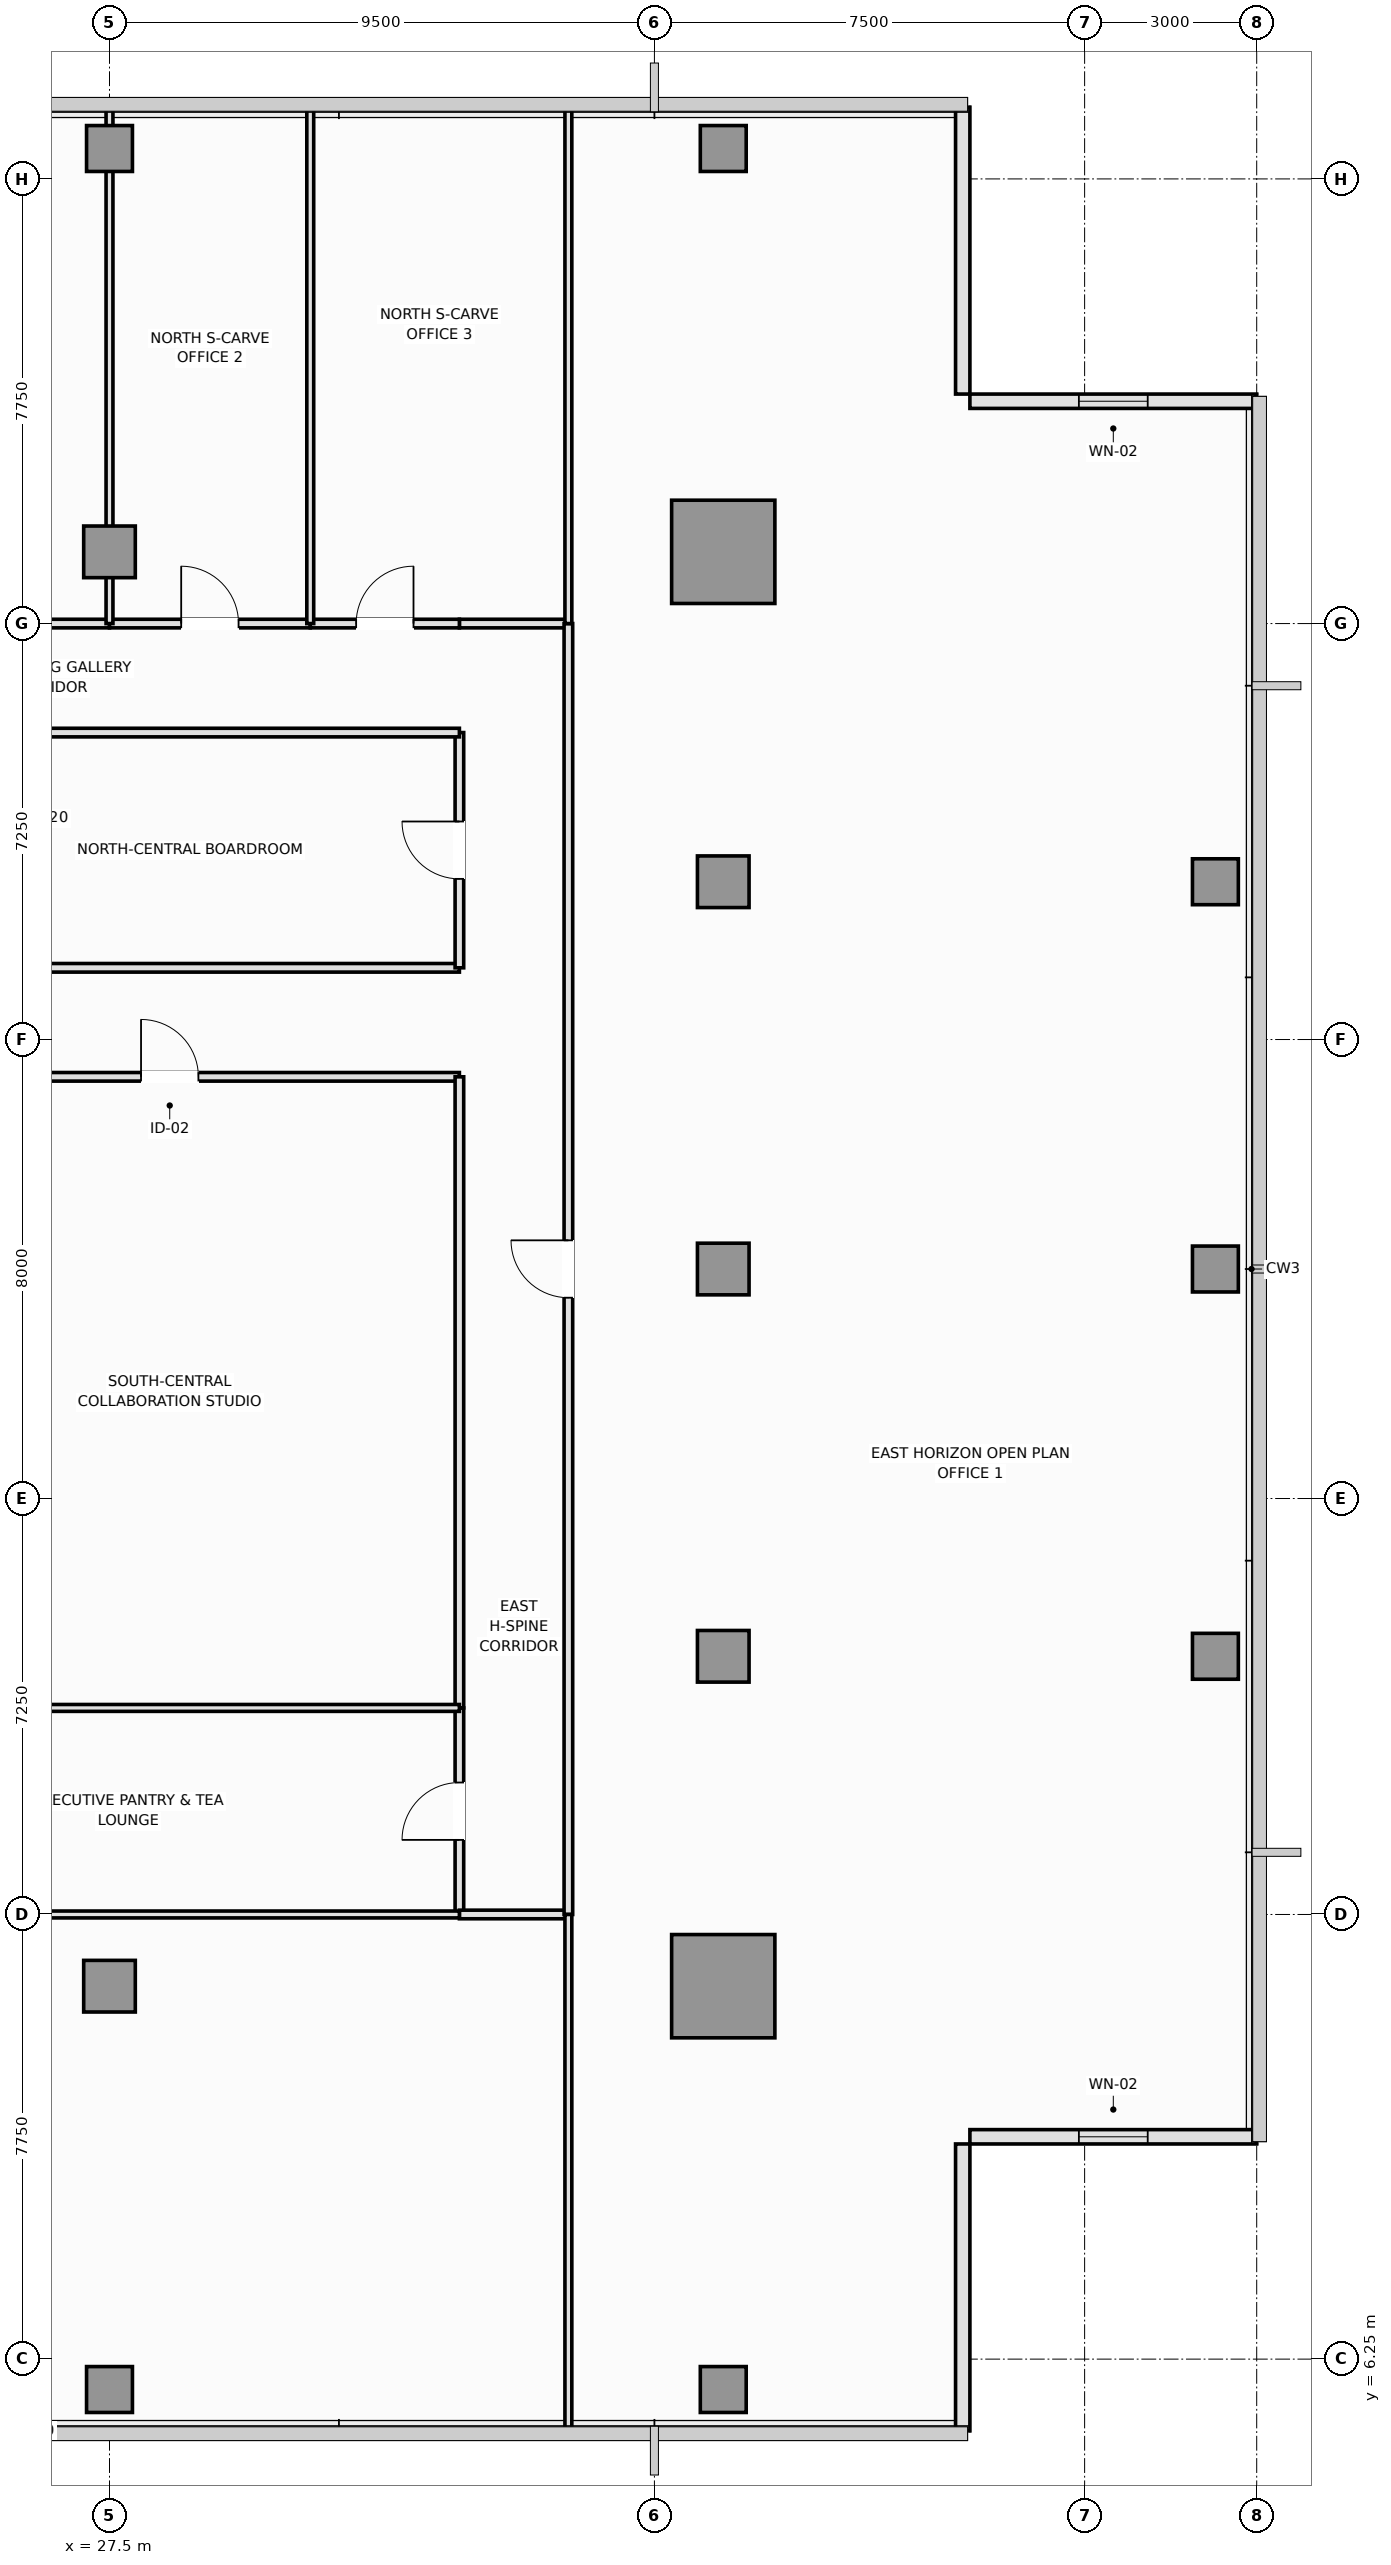
"""IFC4 building model, lengths in metres.
Left out: names, types, materials, properties, quantities, classifications, styles, units other than length and angle.
Written with IfcOpenShell. Run it as: python <this file> out.ifc"""

import sys

from ifc_helpers import new_model, si_unit, direction, frame, frame_2d, origin, origin_2d, place, context, subcontext, project, spatial, rectangle, extrude, element, fill, save


model = new_model("IFC4")
c1 = context("Model", 3, precision=1e-05, world=origin(), true_north=direction((0.0, 1.0)))
c2 = subcontext(c1, "Body", "Model", "MODEL_VIEW")
j1 = project(units=[si_unit("LENGTHUNIT", "METRE"), si_unit("PLANEANGLEUNIT", "RADIAN")], contexts=[c1])
p1 = place(None, origin())
s1 = spatial("IfcSite", under=j1, at=p1, CompositionType="ELEMENT")
p2 = place(p1, origin())
s2 = spatial("IfcBuilding", under=s1, at=p2, CompositionType="ELEMENT")
p3 = place(p2, frame((0.0, 0.0, 234.2)))
s3 = spatial("IfcBuildingStorey", under=s2, at=p3, CompositionType="ELEMENT", Elevation=234.2)
for number, where, z_axis, x_axis in (
    (1, (38.2, 12.75, 0.0), (0.0, 0.0, 1.0), (1.0, 0.0, 0.0)),
    (2, (38.2, 37.75, 0.0), (0.0, 0.0, 1.0), (1.0, 0.0, 0.0)),
):
    element("IfcColumn", number, at=place(p3, frame(where, z_axis=z_axis, x_axis=x_axis)), inside=s3, PredefinedType="COLUMN", context=c2, shape_type="SweptSolid", body=[
        extrude(rectangle(XDim=1.8, YDim=1.8, at=origin_2d()), origin(), (0.0, 0.0, 1.0), 3.55),
    ])
for number, where, z_axis, x_axis in (
    (3, (27.5, 12.75, 0.0), (0.0, 0.0, 1.0), (1.0, 0.0, 0.0)),
    (4, (27.5, 37.75, 0.0), (0.0, 0.0, 1.0), (1.0, 0.0, 0.0)),
    (5, (38.2, 18.5, 0.0), (0.0, 0.0, 1.0), (1.0, 0.0, 0.0)),
    (6, (38.2, 25.25, 0.0), (0.0, 0.0, 1.0), (1.0, 0.0, 0.0)),
    (7, (38.2, 32.0, 0.0), (0.0, 0.0, 1.0), (1.0, 0.0, 0.0)),
):
    element("IfcColumn", number, at=place(p3, frame(where, z_axis=z_axis, x_axis=x_axis)), inside=s3, PredefinedType="COLUMN", context=c2, shape_type="SweptSolid", body=[
        extrude(rectangle(XDim=0.9, YDim=0.9, at=origin_2d()), origin(), (0.0, 0.0, 1.0), 3.55),
    ])
for number, where, z_axis, x_axis in (
    (8, (46.78, 18.5, 0.0), (0.0, 0.0, 1.0), (1.0, 0.0, 0.0)),
    (9, (46.78, 25.25, 0.0), (0.0, 0.0, 1.0), (1.0, 0.0, 0.0)),
    (10, (46.78, 32.0, 0.0), (0.0, 0.0, 1.0), (1.0, 0.0, 0.0)),
    (11, (27.5, 5.72, 0.0), (0.0, 0.0, 1.0), (1.0, 0.0, 0.0)),
    (12, (38.2, 5.72, 0.0), (0.0, 0.0, 1.0), (1.0, 0.0, 0.0)),
    (13, (27.5, 44.78, 0.0), (0.0, 0.0, 1.0), (1.0, 0.0, 0.0)),
    (14, (38.2, 44.78, 0.0), (0.0, 0.0, 1.0), (1.0, 0.0, 0.0)),
):
    element("IfcColumn", number, at=place(p3, frame(where, z_axis=z_axis, x_axis=x_axis)), inside=s3, PredefinedType="COLUMN", context=c2, shape_type="SweptSolid", body=[
        extrude(rectangle(XDim=0.8, YDim=0.8, at=origin_2d()), origin(), (0.0, 0.0, 1.0), 3.55),
    ])
p4 = place(p3, frame((42.375, 5.0, 0.0), z_axis=(0.0, 0.0, 1.0), x_axis=(0.0, 1.0, 0.0)))
e15 = element("IfcWall", 15, at=p4, inside=s3, PredefinedType="SOLIDWALL", context=c2, shape_type="SweptSolid", body=[
    extrude(rectangle(XDim=5.0, YDim=0.25, at=frame_2d((2.5, 0.0))), origin(), (0.0, 0.0, 1.0), 3.37),
])
p5 = place(p3, frame((42.5, 10.125, 0.0), z_axis=(0.0, 0.0, 1.0), x_axis=(1.0, 0.0, 0.0)))
e16 = element("IfcWall", 16, at=p5, inside=s3, PredefinedType="SOLIDWALL", context=c2, shape_type="SweptSolid", body=[
    extrude(rectangle(XDim=5.0, YDim=0.25, at=frame_2d((2.5, 0.0))), origin(), (0.0, 0.0, 1.0), 3.37),
])
p6 = place(p5, frame((1.9, 0.0, 0.9)))
e17 = element("IfcOpeningElement", 17, at=p6, cuts=e16, PredefinedType="OPENING", context=c2, shape_type="SweptSolid", body=[
    extrude(rectangle(XDim=1.2, YDim=1.8, at=frame_2d((0.6, 0.9))), frame((0.0, 0.135, 0.0), z_axis=(0.0, -1.0, 0.0), x_axis=(1.0, 0.0, 0.0)), (0.0, 0.0, 1.0), 0.27),
])
p7 = place(p3, frame((47.5, 40.375, 0.0), z_axis=(0.0, 0.0, 1.0), x_axis=(-1.0, 0.0, 0.0)))
e18 = element("IfcWall", 18, at=p7, inside=s3, PredefinedType="SOLIDWALL", context=c2, shape_type="SweptSolid", body=[
    extrude(rectangle(XDim=5.0, YDim=0.25, at=frame_2d((2.5, 0.0))), origin(), (0.0, 0.0, 1.0), 3.37),
])
p8 = place(p7, frame((1.9, 0.0, 0.9)))
e19 = element("IfcOpeningElement", 19, at=p8, cuts=e18, PredefinedType="OPENING", context=c2, shape_type="SweptSolid", body=[
    extrude(rectangle(XDim=1.2, YDim=1.8, at=frame_2d((0.6, 0.9))), frame((0.0, 0.135, 0.0), z_axis=(0.0, -1.0, 0.0), x_axis=(1.0, 0.0, 0.0)), (0.0, 0.0, 1.0), 0.27),
])
p9 = place(p3, frame((42.375, 40.5, 0.0), z_axis=(0.0, 0.0, 1.0), x_axis=(0.0, 1.0, 0.0)))
e20 = element("IfcWall", 20, at=p9, inside=s3, PredefinedType="SOLIDWALL", context=c2, shape_type="SweptSolid", body=[
    extrude(rectangle(XDim=5.0, YDim=0.25, at=frame_2d((2.5, 0.0))), origin(), (0.0, 0.0, 1.0), 3.37),
])
p10 = place(p3, frame((25.65, 30.5, 0.0), z_axis=(0.0, 0.0, 1.0), x_axis=(1.0, 0.0, 0.0)))
e21 = element("IfcWall", 21, at=p10, inside=s3, PredefinedType="PARTITIONING", context=c2, shape_type="SweptSolid", body=[
    extrude(rectangle(XDim=7.95, YDim=0.15, at=frame_2d((3.975, 0.0))), origin(), (0.0, 0.0, 1.0), 3.37),
])
p11 = place(p3, frame((23.5, 28.6, 0.0), z_axis=(0.0, 0.0, 1.0), x_axis=(1.0, 0.0, 0.0)))
e22 = element("IfcWall", 22, at=p11, inside=s3, PredefinedType="PARTITIONING", context=c2, shape_type="SweptSolid", body=[
    extrude(rectangle(XDim=10.1, YDim=0.15, at=frame_2d((5.05, 0.0))), origin(), (0.0, 0.0, 1.0), 3.37),
])
p12 = place(p11, frame((4.55, 0.0, 0.0)))
e23 = element("IfcOpeningElement", 23, at=p12, cuts=e22, PredefinedType="OPENING", context=c2, shape_type="SweptSolid", body=[
    extrude(rectangle(XDim=1.0, YDim=2.15, at=frame_2d((0.5, 1.075))), frame((0.0, 0.085, 0.0), z_axis=(0.0, -1.0, 0.0), x_axis=(1.0, 0.0, 0.0)), (0.0, 0.0, 1.0), 0.17),
])
p13 = place(p3, frame((33.6, 30.5, 0.0), z_axis=(0.0, 0.0, 1.0), x_axis=(0.0, 1.0, 0.0)))
e24 = element("IfcWall", 24, at=p13, inside=s3, PredefinedType="PARTITIONING", context=c2, shape_type="SweptSolid", body=[
    extrude(rectangle(XDim=4.1, YDim=0.15, at=frame_2d((2.05, 0.0))), origin(), (0.0, 0.0, 1.0), 3.37),
])
p14 = place(p13, frame((1.55, 0.0, 0.0)))
e25 = element("IfcOpeningElement", 25, at=p14, cuts=e24, PredefinedType="OPENING", context=c2, shape_type="SweptSolid", body=[
    extrude(rectangle(XDim=1.0, YDim=2.15, at=frame_2d((0.5, 1.075))), frame((0.0, 0.085, 0.0), z_axis=(0.0, -1.0, 0.0), x_axis=(1.0, 0.0, 0.0)), (0.0, 0.0, 1.0), 0.17),
])
p15 = place(p3, frame((33.6, 14.0, 0.0), z_axis=(0.0, 0.0, 1.0), x_axis=(0.0, 1.0, 0.0)))
e26 = element("IfcWall", 26, at=p15, inside=s3, PredefinedType="PARTITIONING", context=c2, shape_type="SweptSolid", body=[
    extrude(rectangle(XDim=3.6, YDim=0.15, at=frame_2d((1.8, 0.0))), origin(), (0.0, 0.0, 1.0), 3.37),
])
p16 = place(p15, frame((1.3, 0.0, 0.0)))
e27 = element("IfcOpeningElement", 27, at=p16, cuts=e26, PredefinedType="OPENING", context=c2, shape_type="SweptSolid", body=[
    extrude(rectangle(XDim=1.0, YDim=2.15, at=frame_2d((0.5, 1.075))), frame((0.0, 0.085, 0.0), z_axis=(0.0, -1.0, 0.0), x_axis=(1.0, 0.0, 0.0)), (0.0, 0.0, 1.0), 0.17),
])
p17 = place(p3, frame((33.6, 17.6, 0.0), z_axis=(0.0, 0.0, 1.0), x_axis=(0.0, 1.0, 0.0)))
e28 = element("IfcWall", 28, at=p17, inside=s3, PredefinedType="PARTITIONING", context=c2, shape_type="SweptSolid", body=[
    extrude(rectangle(XDim=11.0, YDim=0.15, at=frame_2d((5.5, 0.0))), origin(), (0.0, 0.0, 1.0), 3.37),
])
for number, where, z_axis, x_axis in (
    (29, (33.6, 14.0, 0.0), (0.0, 0.0, 1.0), (1.0, 0.0, 0.0)),
    (30, (33.6, 36.5, 0.0), (0.0, 0.0, 1.0), (1.0, 0.0, 0.0)),
):
    element("IfcWall", number, at=place(p3, frame(where, z_axis=z_axis, x_axis=x_axis)), inside=s3, PredefinedType="PARTITIONING", context=c2, shape_type="SweptSolid", body=[
        extrude(rectangle(XDim=1.9, YDim=0.15, at=frame_2d((0.95, 0.0))), origin(), (0.0, 0.0, 1.0), 3.37),
    ])
p18 = place(p3, frame((35.5, 14.0, 0.0), z_axis=(0.0, 0.0, 1.0), x_axis=(0.0, 1.0, 0.0)))
e31 = element("IfcWall", 31, at=p18, inside=s3, PredefinedType="PARTITIONING", context=c2, shape_type="SweptSolid", body=[
    extrude(rectangle(XDim=22.5, YDim=0.15, at=frame_2d((11.25, 0.0))), origin(), (0.0, 0.0, 1.0), 3.37),
])
p19 = place(p18, frame((10.75, 0.0, 0.0)))
e32 = element("IfcOpeningElement", 32, at=p19, cuts=e31, PredefinedType="OPENING", context=c2, shape_type="SweptSolid", body=[
    extrude(rectangle(XDim=1.0, YDim=2.15, at=frame_2d((0.5, 1.075))), frame((0.0, 0.085, 0.0), z_axis=(0.0, -1.0, 0.0), x_axis=(1.0, 0.0, 0.0)), (0.0, 0.0, 1.0), 0.17),
])
p20 = place(p3, frame((25.65, 34.6, 0.0), z_axis=(0.0, 0.0, 1.0), x_axis=(1.0, 0.0, 0.0)))
e33 = element("IfcWall", 33, at=p20, inside=s3, PredefinedType="PARTITIONING", context=c2, shape_type="SweptSolid", body=[
    extrude(rectangle(XDim=7.95, YDim=0.15, at=frame_2d((3.975, 0.0))), origin(), (0.0, 0.0, 1.0), 3.37),
])
p21 = place(p3, frame((19.9, 36.5, 0.0), z_axis=(0.0, 0.0, 1.0), x_axis=(1.0, 0.0, 0.0)))
e34 = element("IfcWall", 34, at=p21, inside=s3, PredefinedType="PARTITIONING", context=c2, shape_type="SweptSolid", body=[
    extrude(rectangle(XDim=7.6, YDim=0.15, at=frame_2d((3.8, 0.0))), origin(), (0.0, 0.0, 1.0), 3.37),
])
p22 = place(p3, frame((27.5, 36.5, 0.0), z_axis=(0.0, 0.0, 1.0), x_axis=(1.0, 0.0, 0.0)))
e35 = element("IfcWall", 35, at=p22, inside=s3, PredefinedType="PARTITIONING", context=c2, shape_type="SweptSolid", body=[
    extrude(rectangle(XDim=3.5, YDim=0.15, at=frame_2d((1.75, 0.0))), origin(), (0.0, 0.0, 1.0), 3.37),
])
p23 = place(p22, frame((1.25, 0.0, 0.0)))
e36 = element("IfcOpeningElement", 36, at=p23, cuts=e35, PredefinedType="OPENING", context=c2, shape_type="SweptSolid", body=[
    extrude(rectangle(XDim=1.0, YDim=2.15, at=frame_2d((0.5, 1.075))), frame((0.0, 0.085, 0.0), z_axis=(0.0, -1.0, 0.0), x_axis=(1.0, 0.0, 0.0)), (0.0, 0.0, 1.0), 0.17),
])
p24 = place(p3, frame((31.0, 36.5, 0.0), z_axis=(0.0, 0.0, 1.0), x_axis=(1.0, 0.0, 0.0)))
e37 = element("IfcWall", 37, at=p24, inside=s3, PredefinedType="PARTITIONING", context=c2, shape_type="SweptSolid", body=[
    extrude(rectangle(XDim=2.6, YDim=0.15, at=frame_2d((1.3, 0.0))), origin(), (0.0, 0.0, 1.0), 3.37),
])
p25 = place(p24, frame((0.8, 0.0, 0.0)))
e38 = element("IfcOpeningElement", 38, at=p25, cuts=e37, PredefinedType="OPENING", context=c2, shape_type="SweptSolid", body=[
    extrude(rectangle(XDim=1.0, YDim=2.15, at=frame_2d((0.5, 1.075))), frame((0.0, 0.085, 0.0), z_axis=(0.0, -1.0, 0.0), x_axis=(1.0, 0.0, 0.0)), (0.0, 0.0, 1.0), 0.17),
])
for number, where, z_axis, x_axis in (
    (39, (23.5, 17.6, 0.0), (0.0, 0.0, 1.0), (1.0, 0.0, 0.0)),
    (40, (23.5, 14.0, 0.0), (0.0, 0.0, 1.0), (1.0, 0.0, 0.0)),
):
    element("IfcWall", number, at=place(p3, frame(where, z_axis=z_axis, x_axis=x_axis)), inside=s3, PredefinedType="PARTITIONING", context=c2, shape_type="SweptSolid", body=[
        extrude(rectangle(XDim=10.1, YDim=0.12, at=frame_2d((5.05, 0.0))), origin(), (0.0, 0.0, 1.0), 3.37),
    ])
p26 = place(p3, frame((35.5, 5.01, 0.0), z_axis=(0.0, 0.0, 1.0), x_axis=(0.0, 1.0, 0.0)))
e41 = element("IfcWall", 41, at=p26, inside=s3, PredefinedType="PARTITIONING", context=c2, shape_type="SweptSolid", body=[
    extrude(rectangle(XDim=8.99, YDim=0.12, at=frame_2d((4.495, 0.0))), origin(), (0.0, 0.0, 1.0), 3.37),
])
p27 = place(p3, frame((27.5, 36.5, 0.0), z_axis=(0.0, 0.0, 1.0), x_axis=(0.0, 1.0, 0.0)))
e42 = element("IfcWall", 42, at=p27, inside=s3, PredefinedType="PARTITIONING", context=c2, shape_type="SweptSolid", body=[
    extrude(rectangle(XDim=8.99, YDim=0.12, at=frame_2d((4.495, 0.0))), origin(), (0.0, 0.0, 1.0), 2.92),
])
for number, where, z_axis, x_axis in (
    (43, (31.0, 36.5, 0.0), (0.0, 0.0, 1.0), (0.0, 1.0, 0.0)),
    (44, (35.5, 36.5, 0.0), (0.0, 0.0, 1.0), (0.0, 1.0, 0.0)),
):
    element("IfcWall", number, at=place(p3, frame(where, z_axis=z_axis, x_axis=x_axis)), inside=s3, PredefinedType="PARTITIONING", context=c2, shape_type="SweptSolid", body=[
        extrude(rectangle(XDim=8.99, YDim=0.12, at=frame_2d((4.495, 0.0))), origin(), (0.0, 0.0, 1.0), 3.37),
    ])
p28 = place(p6, origin())
e45 = element("IfcWindow", 45, at=p28, inside=s3, PartitioningType="SINGLE_PANEL", PredefinedType="WINDOW", context=c2, shape_type="SweptSolid", body=[
    extrude(rectangle(XDim=1.2, YDim=1.8, at=frame_2d((0.6, 0.9))), frame((0.0, 0.03, 0.0), z_axis=(0.0, -1.0, 0.0), x_axis=(1.0, 0.0, 0.0)), (0.0, 0.0, 1.0), 0.06),
])
fill(e17, e45)
p29 = place(p8, origin())
e46 = element("IfcWindow", 46, at=p29, inside=s3, PartitioningType="SINGLE_PANEL", PredefinedType="WINDOW", context=c2, shape_type="SweptSolid", body=[
    extrude(rectangle(XDim=1.2, YDim=1.8, at=frame_2d((0.6, 0.9))), frame((0.0, 0.03, 0.0), z_axis=(0.0, -1.0, 0.0), x_axis=(1.0, 0.0, 0.0)), (0.0, 0.0, 1.0), 0.06),
])
fill(e19, e46)
p30 = place(p12, origin())
e47 = element("IfcDoor", 47, at=p30, inside=s3, OperationType="SINGLE_SWING_LEFT", PredefinedType="DOOR", context=c2, shape_type="SweptSolid", body=[
    extrude(rectangle(XDim=1.0, YDim=2.15, at=frame_2d((0.5, 1.075))), frame((0.0, 0.025, 0.0), z_axis=(0.0, -1.0, 0.0), x_axis=(1.0, 0.0, 0.0)), (0.0, 0.0, 1.0), 0.05),
])
fill(e23, e47)
p31 = place(p14, origin())
e48 = element("IfcDoor", 48, at=p31, inside=s3, OperationType="SINGLE_SWING_RIGHT", PredefinedType="DOOR", context=c2, shape_type="SweptSolid", body=[
    extrude(rectangle(XDim=1.0, YDim=2.15, at=frame_2d((0.5, 1.075))), frame((0.0, 0.025, 0.0), z_axis=(0.0, -1.0, 0.0), x_axis=(1.0, 0.0, 0.0)), (0.0, 0.0, 1.0), 0.05),
])
fill(e25, e48)
p32 = place(p16, origin())
e49 = element("IfcDoor", 49, at=p32, inside=s3, OperationType="SINGLE_SWING_LEFT", PredefinedType="DOOR", context=c2, shape_type="SweptSolid", body=[
    extrude(rectangle(XDim=1.0, YDim=2.15, at=frame_2d((0.5, 1.075))), frame((0.0, 0.025, 0.0), z_axis=(0.0, -1.0, 0.0), x_axis=(1.0, 0.0, 0.0)), (0.0, 0.0, 1.0), 0.05),
])
fill(e27, e49)
p33 = place(p19, origin())
e50 = element("IfcDoor", 50, at=p33, inside=s3, OperationType="SINGLE_SWING_RIGHT", PredefinedType="DOOR", context=c2, shape_type="SweptSolid", body=[
    extrude(rectangle(XDim=1.0, YDim=2.15, at=frame_2d((0.5, 1.075))), frame((0.0, 0.025, 0.0), z_axis=(0.0, -1.0, 0.0), x_axis=(1.0, 0.0, 0.0)), (0.0, 0.0, 1.0), 0.05),
])
fill(e32, e50)
p34 = place(p23, origin())
e51 = element("IfcDoor", 51, at=p34, inside=s3, OperationType="SINGLE_SWING_LEFT", PredefinedType="DOOR", context=c2, shape_type="SweptSolid", body=[
    extrude(rectangle(XDim=1.0, YDim=2.15, at=frame_2d((0.5, 1.075))), frame((0.0, 0.025, 0.0), z_axis=(0.0, -1.0, 0.0), x_axis=(1.0, 0.0, 0.0)), (0.0, 0.0, 1.0), 0.05),
])
fill(e36, e51)
p35 = place(p25, origin())
e52 = element("IfcDoor", 52, at=p35, inside=s3, OperationType="SINGLE_SWING_RIGHT", PredefinedType="DOOR", context=c2, shape_type="SweptSolid", body=[
    extrude(rectangle(XDim=1.0, YDim=2.15, at=frame_2d((0.5, 1.075))), frame((0.0, 0.025, 0.0), z_axis=(0.0, -1.0, 0.0), x_axis=(1.0, 0.0, 0.0)), (0.0, 0.0, 1.0), 0.05),
])
fill(e38, e52)
save(model, sys.argv[1])
